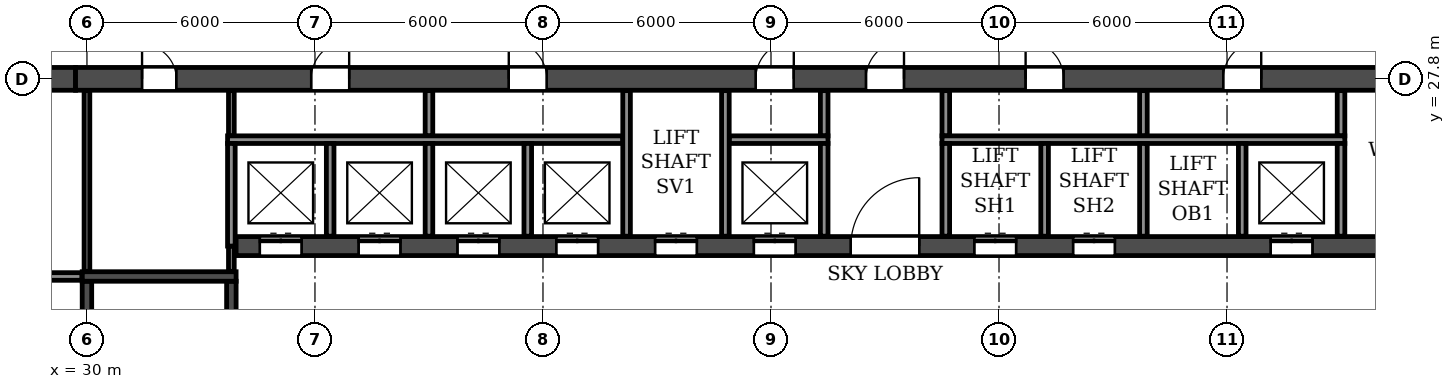
"""IFC4 building model, lengths in metres.
Left out: names, types, materials, properties, quantities, classifications, styles, units other than length and angle.
Written with IfcOpenShell. Run it as: python <this file> out.ifc"""

import sys

from ifc_helpers import new_model, si_unit, direction, frame, frame_2d, origin, place, context, subcontext, project, spatial, rectangle, extrude, element, fill, save


model = new_model("IFC4")
c1 = context("Model", 3, precision=1e-05, world=origin(), true_north=direction((0.0, 1.0)))
c2 = subcontext(c1, "Body", "Model", "MODEL_VIEW")
j1 = project(units=[si_unit("LENGTHUNIT", "METRE"), si_unit("PLANEANGLEUNIT", "RADIAN")], contexts=[c1])
p1 = place(None, origin())
s1 = spatial("IfcSite", under=j1, at=p1, CompositionType="ELEMENT")
p2 = place(p1, origin())
s2 = spatial("IfcBuilding", under=s1, at=p2, CompositionType="ELEMENT")
p3 = place(p2, frame((0.0, 0.0, 115.8)))
s3 = spatial("IfcBuildingStorey", under=s2, at=p3, CompositionType="ELEMENT", Elevation=115.8)
p4 = place(p3, frame((24.9, 27.8, 0.0), z_axis=(0.0, 0.0, 1.0), x_axis=(1.0, 0.0, 0.0)))
e1 = element("IfcWall", 1, at=p4, inside=s3, PredefinedType="SHEAR", context=c2, shape_type="SweptSolid", body=[
    extrude(rectangle(XDim=4.8, YDim=0.6, at=frame_2d((2.4, 0.0))), origin(), (0.0, 0.0, 1.0), 6.37),
])
p5 = place(p4, frame((1.9, 0.0, 0.0)))
e2 = element("IfcOpeningElement", 2, at=p5, cuts=e1, PredefinedType="OPENING", context=c2, shape_type="SweptSolid", body=[
    extrude(rectangle(XDim=1.0, YDim=2.1, at=frame_2d((0.5, 1.05))), frame((0.0, 0.31, 0.0), z_axis=(0.0, -1.0, 0.0), x_axis=(1.0, 0.0, 0.0)), (0.0, 0.0, 1.0), 0.62),
])
p6 = place(p3, frame((29.7, 27.8, 0.0), z_axis=(0.0, 0.0, 1.0), x_axis=(1.0, 0.0, 0.0)))
e3 = element("IfcWall", 3, at=p6, inside=s3, PredefinedType="SOLIDWALL", context=c2, shape_type="SweptSolid", body=[
    extrude(rectangle(XDim=42.6, YDim=0.6, at=frame_2d((21.3, 0.0))), origin(), (0.0, 0.0, 1.0), 6.37),
])
p7 = place(p6, frame((1.75, 0.0, 0.0)))
e4 = element("IfcOpeningElement", 4, at=p7, cuts=e3, PredefinedType="OPENING", context=c2, shape_type="SweptSolid", body=[
    extrude(rectangle(XDim=0.9, YDim=2.1, at=frame_2d((0.45, 1.05))), frame((0.0, 0.31, 0.0), z_axis=(0.0, -1.0, 0.0), x_axis=(1.0, 0.0, 0.0)), (0.0, 0.0, 1.0), 0.62),
])
p8 = place(p6, frame((6.2, 0.0, 0.0)))
e5 = element("IfcOpeningElement", 5, at=p8, cuts=e3, PredefinedType="OPENING", context=c2, shape_type="SweptSolid", body=[
    extrude(rectangle(XDim=1.0, YDim=2.1, at=frame_2d((0.5, 1.05))), frame((0.0, 0.31, 0.0), z_axis=(0.0, -1.0, 0.0), x_axis=(1.0, 0.0, 0.0)), (0.0, 0.0, 1.0), 0.62),
])
p9 = place(p6, frame((11.4, 0.0, 0.0)))
e6 = element("IfcOpeningElement", 6, at=p9, cuts=e3, PredefinedType="OPENING", context=c2, shape_type="SweptSolid", body=[
    extrude(rectangle(XDim=1.0, YDim=2.1, at=frame_2d((0.5, 1.05))), frame((0.0, 0.31, 0.0), z_axis=(0.0, -1.0, 0.0), x_axis=(1.0, 0.0, 0.0)), (0.0, 0.0, 1.0), 0.62),
])
p10 = place(p6, frame((17.9, 0.0, 0.0)))
e7 = element("IfcOpeningElement", 7, at=p10, cuts=e3, PredefinedType="OPENING", context=c2, shape_type="SweptSolid", body=[
    extrude(rectangle(XDim=1.0, YDim=2.1, at=frame_2d((0.5, 1.05))), frame((0.0, 0.31, 0.0), z_axis=(0.0, -1.0, 0.0), x_axis=(1.0, 0.0, 0.0)), (0.0, 0.0, 1.0), 0.62),
])
p11 = place(p6, frame((20.8, 0.0, 0.0)))
e8 = element("IfcOpeningElement", 8, at=p11, cuts=e3, PredefinedType="OPENING", context=c2, shape_type="SweptSolid", body=[
    extrude(rectangle(XDim=1.0, YDim=2.1, at=frame_2d((0.5, 1.05))), frame((0.0, 0.31, 0.0), z_axis=(0.0, -1.0, 0.0), x_axis=(1.0, 0.0, 0.0)), (0.0, 0.0, 1.0), 0.62),
])
p12 = place(p6, frame((25.0, 0.0, 0.0)))
e9 = element("IfcOpeningElement", 9, at=p12, cuts=e3, PredefinedType="OPENING", context=c2, shape_type="SweptSolid", body=[
    extrude(rectangle(XDim=1.0, YDim=2.1, at=frame_2d((0.5, 1.05))), frame((0.0, 0.31, 0.0), z_axis=(0.0, -1.0, 0.0), x_axis=(1.0, 0.0, 0.0)), (0.0, 0.0, 1.0), 0.62),
])
p13 = place(p6, frame((30.2, 0.0, 0.0)))
e10 = element("IfcOpeningElement", 10, at=p13, cuts=e3, PredefinedType="OPENING", context=c2, shape_type="SweptSolid", body=[
    extrude(rectangle(XDim=1.0, YDim=2.1, at=frame_2d((0.5, 1.05))), frame((0.0, 0.31, 0.0), z_axis=(0.0, -1.0, 0.0), x_axis=(1.0, 0.0, 0.0)), (0.0, 0.0, 1.0), 0.62),
])
p14 = place(p6, frame((35.15, 0.0, 0.0)))
e11 = element("IfcOpeningElement", 11, at=p14, cuts=e3, PredefinedType="OPENING", context=c2, shape_type="SweptSolid", body=[
    extrude(rectangle(XDim=1.5, YDim=2.1, at=frame_2d((0.75, 1.05))), frame((0.0, 0.31, 0.0), z_axis=(0.0, -1.0, 0.0), x_axis=(1.0, 0.0, 0.0)), (0.0, 0.0, 1.0), 0.62),
])
p15 = place(p6, frame((39.95, 0.0, 0.0)))
e12 = element("IfcOpeningElement", 12, at=p15, cuts=e3, PredefinedType="OPENING", context=c2, shape_type="SweptSolid", body=[
    extrude(rectangle(XDim=0.9, YDim=2.1, at=frame_2d((0.45, 1.05))), frame((0.0, 0.31, 0.0), z_axis=(0.0, -1.0, 0.0), x_axis=(1.0, 0.0, 0.0)), (0.0, 0.0, 1.0), 0.62),
])
p16 = place(p3, frame((33.925, 23.4, 0.0), z_axis=(0.0, 0.0, 1.0), x_axis=(1.0, 0.0, 0.0)))
e13 = element("IfcWall", 13, at=p16, inside=s3, PredefinedType="SOLIDWALL", context=c2, shape_type="SweptSolid", body=[
    extrude(rectangle(XDim=34.15, YDim=0.5, at=frame_2d((17.075, 0.0))), origin(), (0.0, 0.0, 1.0), 6.37),
])
p17 = place(p16, frame((16.175, 0.0, 0.0)))
e14 = element("IfcOpeningElement", 14, at=p17, cuts=e13, PredefinedType="OPENING", context=c2, shape_type="SweptSolid", body=[
    extrude(rectangle(XDim=1.8, YDim=2.1, at=frame_2d((0.9, 1.05))), frame((0.0, 0.26, 0.0), z_axis=(0.0, -1.0, 0.0), x_axis=(1.0, 0.0, 0.0)), (0.0, 0.0, 1.0), 0.52),
])
p18 = place(p16, frame((0.625, 0.0, 0.0)))
e15 = element("IfcOpeningElement", 15, at=p18, cuts=e13, PredefinedType="OPENING", context=c2, shape_type="SweptSolid", body=[
    extrude(rectangle(XDim=1.1, YDim=2.1, at=frame_2d((0.55, 1.05))), frame((0.0, 0.26, 0.0), z_axis=(0.0, -1.0, 0.0), x_axis=(1.0, 0.0, 0.0)), (0.0, 0.0, 1.0), 0.52),
])
p19 = place(p16, frame((3.225, 0.0, 0.0)))
e16 = element("IfcOpeningElement", 16, at=p19, cuts=e13, PredefinedType="OPENING", context=c2, shape_type="SweptSolid", body=[
    extrude(rectangle(XDim=1.1, YDim=2.1, at=frame_2d((0.55, 1.05))), frame((0.0, 0.26, 0.0), z_axis=(0.0, -1.0, 0.0), x_axis=(1.0, 0.0, 0.0)), (0.0, 0.0, 1.0), 0.52),
])
p20 = place(p16, frame((5.825, 0.0, 0.0)))
e17 = element("IfcOpeningElement", 17, at=p20, cuts=e13, PredefinedType="OPENING", context=c2, shape_type="SweptSolid", body=[
    extrude(rectangle(XDim=1.1, YDim=2.1, at=frame_2d((0.55, 1.05))), frame((0.0, 0.26, 0.0), z_axis=(0.0, -1.0, 0.0), x_axis=(1.0, 0.0, 0.0)), (0.0, 0.0, 1.0), 0.52),
])
p21 = place(p16, frame((8.425, 0.0, 0.0)))
e18 = element("IfcOpeningElement", 18, at=p21, cuts=e13, PredefinedType="OPENING", context=c2, shape_type="SweptSolid", body=[
    extrude(rectangle(XDim=1.1, YDim=2.1, at=frame_2d((0.55, 1.05))), frame((0.0, 0.26, 0.0), z_axis=(0.0, -1.0, 0.0), x_axis=(1.0, 0.0, 0.0)), (0.0, 0.0, 1.0), 0.52),
])
p22 = place(p16, frame((11.025, 0.0, 0.0)))
e19 = element("IfcOpeningElement", 19, at=p22, cuts=e13, PredefinedType="OPENING", context=c2, shape_type="SweptSolid", body=[
    extrude(rectangle(XDim=1.1, YDim=2.1, at=frame_2d((0.55, 1.05))), frame((0.0, 0.26, 0.0), z_axis=(0.0, -1.0, 0.0), x_axis=(1.0, 0.0, 0.0)), (0.0, 0.0, 1.0), 0.52),
])
p23 = place(p16, frame((13.625, 0.0, 0.0)))
e20 = element("IfcOpeningElement", 20, at=p23, cuts=e13, PredefinedType="OPENING", context=c2, shape_type="SweptSolid", body=[
    extrude(rectangle(XDim=1.1, YDim=2.1, at=frame_2d((0.55, 1.05))), frame((0.0, 0.26, 0.0), z_axis=(0.0, -1.0, 0.0), x_axis=(1.0, 0.0, 0.0)), (0.0, 0.0, 1.0), 0.52),
])
p24 = place(p16, frame((19.425, 0.0, 0.0)))
e21 = element("IfcOpeningElement", 21, at=p24, cuts=e13, PredefinedType="OPENING", context=c2, shape_type="SweptSolid", body=[
    extrude(rectangle(XDim=1.1, YDim=2.1, at=frame_2d((0.55, 1.05))), frame((0.0, 0.26, 0.0), z_axis=(0.0, -1.0, 0.0), x_axis=(1.0, 0.0, 0.0)), (0.0, 0.0, 1.0), 0.52),
])
p25 = place(p16, frame((22.025, 0.0, 0.0)))
e22 = element("IfcOpeningElement", 22, at=p25, cuts=e13, PredefinedType="OPENING", context=c2, shape_type="SweptSolid", body=[
    extrude(rectangle(XDim=1.1, YDim=2.1, at=frame_2d((0.55, 1.05))), frame((0.0, 0.26, 0.0), z_axis=(0.0, -1.0, 0.0), x_axis=(1.0, 0.0, 0.0)), (0.0, 0.0, 1.0), 0.52),
])
p26 = place(p16, frame((27.225, 0.0, 0.0)))
e23 = element("IfcOpeningElement", 23, at=p26, cuts=e13, PredefinedType="OPENING", context=c2, shape_type="SweptSolid", body=[
    extrude(rectangle(XDim=1.1, YDim=2.1, at=frame_2d((0.55, 1.05))), frame((0.0, 0.26, 0.0), z_axis=(0.0, -1.0, 0.0), x_axis=(1.0, 0.0, 0.0)), (0.0, 0.0, 1.0), 0.52),
])
p27 = place(p3, frame((30.0, 14.85, 0.0), z_axis=(0.0, 0.0, 1.0), x_axis=(0.0, 1.0, 0.0)))
e24 = element("IfcWall", 24, at=p27, inside=s3, PredefinedType="SOLIDWALL", context=c2, shape_type="SweptSolid", body=[
    extrude(rectangle(XDim=7.625, YDim=0.25, at=frame_2d((3.812, 0.0))), origin(), (0.0, 0.0, 1.0), 6.37),
])
p28 = place(p3, frame((33.8, 14.85, 0.0), z_axis=(0.0, 0.0, 1.0), x_axis=(0.0, 1.0, 0.0)))
e25 = element("IfcWall", 25, at=p28, inside=s3, PredefinedType="SOLIDWALL", context=c2, shape_type="SweptSolid", body=[
    extrude(rectangle(XDim=7.625, YDim=0.25, at=frame_2d((3.812, 0.0))), origin(), (0.0, 0.0, 1.0), 6.37),
])
p29 = place(p28, frame((0.45, 0.0, 0.0)))
e26 = element("IfcOpeningElement", 26, at=p29, cuts=e25, PredefinedType="OPENING", context=c2, shape_type="SweptSolid", body=[
    extrude(rectangle(XDim=1.0, YDim=2.1, at=frame_2d((0.5, 1.05))), frame((0.0, 0.135, 0.0), z_axis=(0.0, -1.0, 0.0), x_axis=(1.0, 0.0, 0.0)), (0.0, 0.0, 1.0), 0.27),
])
p30 = place(p3, frame((29.875, 22.6, 0.0), z_axis=(0.0, 0.0, 1.0), x_axis=(1.0, 0.0, 0.0)))
e27 = element("IfcWall", 27, at=p30, inside=s3, PredefinedType="SOLIDWALL", context=c2, shape_type="SweptSolid", body=[
    extrude(rectangle(XDim=4.05, YDim=0.25, at=frame_2d((2.025, 0.0))), origin(), (0.0, 0.0, 1.0), 6.37),
])
for number, where, z_axis, x_axis in (
    (28, (39.0, 26.3, 0.0), (0.0, 0.0, 1.0), (0.0, 1.0, 0.0)),
    (29, (49.4, 26.3, 0.0), (0.0, 0.0, 1.0), (0.0, 1.0, 0.0)),
    (30, (52.6, 26.3, 0.0), (0.0, 0.0, 1.0), (0.0, 1.0, 0.0)),
    (31, (57.8, 26.3, 0.0), (0.0, 0.0, 1.0), (0.0, 1.0, 0.0)),
    (32, (63.0, 26.3, 0.0), (0.0, 0.0, 1.0), (0.0, 1.0, 0.0)),
):
    element("IfcWall", number, at=place(p3, frame(where, z_axis=z_axis, x_axis=x_axis)), inside=s3, PredefinedType="PARTITIONING", context=c2, shape_type="SweptSolid", body=[
        extrude(rectangle(XDim=1.19, YDim=0.2, at=frame_2d((0.595, 0.0))), origin(), (0.0, 0.0, 1.0), 6.37),
    ])
p31 = place(p3, frame((24.735, 22.6, 0.0), z_axis=(0.0, 0.0, 1.0), x_axis=(1.0, 0.0, 0.0)))
e33 = element("IfcWall", 33, at=p31, inside=s3, PredefinedType="PARTITIONING", context=c2, shape_type="SweptSolid", body=[
    extrude(rectangle(XDim=5.13, YDim=0.2, at=frame_2d((2.565, 0.0))), origin(), (0.0, 0.0, 1.0), 6.37),
])
p32 = place(p3, frame((30.0, 22.735, 0.0), z_axis=(0.0, 0.0, 1.0), x_axis=(0.0, 1.0, 0.0)))
e34 = element("IfcWall", 34, at=p32, inside=s3, PredefinedType="PARTITIONING", context=c2, shape_type="SweptSolid", body=[
    extrude(rectangle(XDim=4.755, YDim=0.15, at=frame_2d((2.377, 0.0))), origin(), (0.0, 0.0, 1.0), 6.37),
])
p33 = place(p3, frame((33.8, 22.735, 0.0), z_axis=(0.0, 0.0, 1.0), x_axis=(0.0, 1.0, 0.0)))
e35 = element("IfcWall", 35, at=p33, inside=s3, PredefinedType="PARTITIONING", context=c2, shape_type="SweptSolid", body=[
    extrude(rectangle(XDim=0.665, YDim=0.15, at=frame_2d((0.333, 0.0))), origin(), (0.0, 0.0, 1.0), 6.37),
])
p34 = place(p3, frame((33.8, 26.3, 0.0), z_axis=(0.0, 0.0, 1.0), x_axis=(0.0, 1.0, 0.0)))
e36 = element("IfcWall", 36, at=p34, inside=s3, PredefinedType="PARTITIONING", context=c2, shape_type="SweptSolid", body=[
    extrude(rectangle(XDim=1.19, YDim=0.15, at=frame_2d((0.595, 0.0))), origin(), (0.0, 0.0, 1.0), 6.37),
])
p35 = place(p3, frame((33.7, 26.2, 0.0), z_axis=(0.0, 0.0, 1.0), x_axis=(1.0, 0.0, 0.0)))
e37 = element("IfcWall", 37, at=p35, inside=s3, PredefinedType="PARTITIONING", context=c2, shape_type="SweptSolid", body=[
    extrude(rectangle(XDim=10.4, YDim=0.2, at=frame_2d((5.2, 0.0))), origin(), (0.0, 0.0, 1.0), 6.37),
])
p36 = place(p3, frame((46.9, 26.2, 0.0), z_axis=(0.0, 0.0, 1.0), x_axis=(1.0, 0.0, 0.0)))
e38 = element("IfcWall", 38, at=p36, inside=s3, PredefinedType="PARTITIONING", context=c2, shape_type="SweptSolid", body=[
    extrude(rectangle(XDim=2.6, YDim=0.2, at=frame_2d((1.3, 0.0))), origin(), (0.0, 0.0, 1.0), 6.37),
])
p37 = place(p3, frame((52.5, 26.2, 0.0), z_axis=(0.0, 0.0, 1.0), x_axis=(1.0, 0.0, 0.0)))
e39 = element("IfcWall", 39, at=p37, inside=s3, PredefinedType="PARTITIONING", context=c2, shape_type="SweptSolid", body=[
    extrude(rectangle(XDim=10.6, YDim=0.2, at=frame_2d((5.3, 0.0))), origin(), (0.0, 0.0, 1.0), 6.37),
])
p38 = place(p3, frame((33.8, 23.4, 0.0), z_axis=(0.0, 0.0, 1.0), x_axis=(0.0, 1.0, 0.0)))
e40 = element("IfcWall", 40, at=p38, inside=s3, PredefinedType="PARTITIONING", context=c2, shape_type="SweptSolid", body=[
    extrude(rectangle(XDim=2.7, YDim=0.2, at=frame_2d((1.35, 0.0))), origin(), (0.0, 0.0, 1.0), 6.37),
])
for number, where, z_axis, x_axis in (
    (41, (36.4, 23.66, 0.0), (0.0, 0.0, 1.0), (0.0, 1.0, 0.0)),
    (42, (39.0, 23.66, 0.0), (0.0, 0.0, 1.0), (0.0, 1.0, 0.0)),
    (43, (41.6, 23.66, 0.0), (0.0, 0.0, 1.0), (0.0, 1.0, 0.0)),
):
    element("IfcWall", number, at=place(p3, frame(where, z_axis=z_axis, x_axis=x_axis)), inside=s3, PredefinedType="PARTITIONING", context=c2, shape_type="SweptSolid", body=[
        extrude(rectangle(XDim=2.44, YDim=0.2, at=frame_2d((1.22, 0.0))), origin(), (0.0, 0.0, 1.0), 6.37),
    ])
for number, where, z_axis, x_axis in (
    (44, (44.2, 23.66, 0.0), (0.0, 0.0, 1.0), (0.0, 1.0, 0.0)),
    (45, (46.8, 23.66, 0.0), (0.0, 0.0, 1.0), (0.0, 1.0, 0.0)),
):
    element("IfcWall", number, at=place(p3, frame(where, z_axis=z_axis, x_axis=x_axis)), inside=s3, PredefinedType="PARTITIONING", context=c2, shape_type="SweptSolid", body=[
        extrude(rectangle(XDim=3.83, YDim=0.2, at=frame_2d((1.915, 0.0))), origin(), (0.0, 0.0, 1.0), 6.37),
    ])
for number, where, z_axis, x_axis in (
    (46, (49.4, 23.66, 0.0), (0.0, 0.0, 1.0), (0.0, 1.0, 0.0)),
    (47, (52.6, 23.66, 0.0), (0.0, 0.0, 1.0), (0.0, 1.0, 0.0)),
    (48, (55.2, 23.66, 0.0), (0.0, 0.0, 1.0), (0.0, 1.0, 0.0)),
    (49, (57.8, 23.66, 0.0), (0.0, 0.0, 1.0), (0.0, 1.0, 0.0)),
    (50, (60.4, 23.66, 0.0), (0.0, 0.0, 1.0), (0.0, 1.0, 0.0)),
    (51, (63.0, 23.66, 0.0), (0.0, 0.0, 1.0), (0.0, 1.0, 0.0)),
):
    element("IfcWall", number, at=place(p3, frame(where, z_axis=z_axis, x_axis=x_axis)), inside=s3, PredefinedType="PARTITIONING", context=c2, shape_type="SweptSolid", body=[
        extrude(rectangle(XDim=2.44, YDim=0.2, at=frame_2d((1.22, 0.0))), origin(), (0.0, 0.0, 1.0), 6.37),
    ])
p39 = place(p7, origin())
e52 = element("IfcDoor", 52, at=p39, inside=s3, OperationType="SINGLE_SWING_LEFT", PredefinedType="DOOR", context=c2, shape_type="SweptSolid", body=[
    extrude(rectangle(XDim=0.9, YDim=2.1, at=frame_2d((0.45, 1.05))), frame((0.0, 0.025, 0.0), z_axis=(0.0, -1.0, 0.0), x_axis=(1.0, 0.0, 0.0)), (0.0, 0.0, 1.0), 0.05),
])
fill(e4, e52)
p40 = place(p8, origin())
e53 = element("IfcDoor", 53, at=p40, inside=s3, OperationType="SINGLE_SWING_RIGHT", PredefinedType="DOOR", context=c2, shape_type="SweptSolid", body=[
    extrude(rectangle(XDim=1.0, YDim=2.1, at=frame_2d((0.5, 1.05))), frame((0.0, 0.025, 0.0), z_axis=(0.0, -1.0, 0.0), x_axis=(1.0, 0.0, 0.0)), (0.0, 0.0, 1.0), 0.05),
])
fill(e5, e53)
p41 = place(p9, origin())
e54 = element("IfcDoor", 54, at=p41, inside=s3, OperationType="SINGLE_SWING_LEFT", PredefinedType="DOOR", context=c2, shape_type="SweptSolid", body=[
    extrude(rectangle(XDim=1.0, YDim=2.1, at=frame_2d((0.5, 1.05))), frame((0.0, 0.025, 0.0), z_axis=(0.0, -1.0, 0.0), x_axis=(1.0, 0.0, 0.0)), (0.0, 0.0, 1.0), 0.05),
])
fill(e6, e54)
p42 = place(p10, origin())
e55 = element("IfcDoor", 55, at=p42, inside=s3, OperationType="SINGLE_SWING_RIGHT", PredefinedType="DOOR", context=c2, shape_type="SweptSolid", body=[
    extrude(rectangle(XDim=1.0, YDim=2.1, at=frame_2d((0.5, 1.05))), frame((0.0, 0.025, 0.0), z_axis=(0.0, -1.0, 0.0), x_axis=(1.0, 0.0, 0.0)), (0.0, 0.0, 1.0), 0.05),
])
fill(e7, e55)
p43 = place(p11, origin())
e56 = element("IfcDoor", 56, at=p43, inside=s3, OperationType="SINGLE_SWING_RIGHT", PredefinedType="DOOR", context=c2, shape_type="SweptSolid", body=[
    extrude(rectangle(XDim=1.0, YDim=2.1, at=frame_2d((0.5, 1.05))), frame((0.0, 0.025, 0.0), z_axis=(0.0, -1.0, 0.0), x_axis=(1.0, 0.0, 0.0)), (0.0, 0.0, 1.0), 0.05),
])
fill(e8, e56)
p44 = place(p12, origin())
e57 = element("IfcDoor", 57, at=p44, inside=s3, OperationType="SINGLE_SWING_LEFT", PredefinedType="DOOR", context=c2, shape_type="SweptSolid", body=[
    extrude(rectangle(XDim=1.0, YDim=2.1, at=frame_2d((0.5, 1.05))), frame((0.0, 0.025, 0.0), z_axis=(0.0, -1.0, 0.0), x_axis=(1.0, 0.0, 0.0)), (0.0, 0.0, 1.0), 0.05),
])
fill(e9, e57)
p45 = place(p13, origin())
e58 = element("IfcDoor", 58, at=p45, inside=s3, OperationType="SINGLE_SWING_RIGHT", PredefinedType="DOOR", context=c2, shape_type="SweptSolid", body=[
    extrude(rectangle(XDim=1.0, YDim=2.1, at=frame_2d((0.5, 1.05))), frame((0.0, 0.025, 0.0), z_axis=(0.0, -1.0, 0.0), x_axis=(1.0, 0.0, 0.0)), (0.0, 0.0, 1.0), 0.05),
])
fill(e10, e58)
p46 = place(p17, origin())
e59 = element("IfcDoor", 59, at=p46, inside=s3, OperationType="DOUBLE_DOOR_SINGLE_SWING", PredefinedType="DOOR", context=c2, shape_type="SweptSolid", body=[
    extrude(rectangle(XDim=1.8, YDim=2.1, at=frame_2d((0.9, 1.05))), frame((0.0, 0.025, 0.0), z_axis=(0.0, -1.0, 0.0), x_axis=(1.0, 0.0, 0.0)), (0.0, 0.0, 1.0), 0.05),
])
fill(e14, e59)
p47 = place(p18, origin())
e60 = element("IfcDoor", 60, at=p47, inside=s3, OperationType="DOUBLE_DOOR_SLIDING", PredefinedType="DOOR", context=c2, shape_type="SweptSolid", body=[
    extrude(rectangle(XDim=1.1, YDim=2.1, at=frame_2d((0.55, 1.05))), frame((0.0, 0.025, 0.0), z_axis=(0.0, -1.0, 0.0), x_axis=(1.0, 0.0, 0.0)), (0.0, 0.0, 1.0), 0.05),
])
fill(e15, e60)
p48 = place(p19, origin())
e61 = element("IfcDoor", 61, at=p48, inside=s3, OperationType="DOUBLE_DOOR_SLIDING", PredefinedType="DOOR", context=c2, shape_type="SweptSolid", body=[
    extrude(rectangle(XDim=1.1, YDim=2.1, at=frame_2d((0.55, 1.05))), frame((0.0, 0.025, 0.0), z_axis=(0.0, -1.0, 0.0), x_axis=(1.0, 0.0, 0.0)), (0.0, 0.0, 1.0), 0.05),
])
fill(e16, e61)
p49 = place(p20, origin())
e62 = element("IfcDoor", 62, at=p49, inside=s3, OperationType="DOUBLE_DOOR_SLIDING", PredefinedType="DOOR", context=c2, shape_type="SweptSolid", body=[
    extrude(rectangle(XDim=1.1, YDim=2.1, at=frame_2d((0.55, 1.05))), frame((0.0, 0.025, 0.0), z_axis=(0.0, -1.0, 0.0), x_axis=(1.0, 0.0, 0.0)), (0.0, 0.0, 1.0), 0.05),
])
fill(e17, e62)
p50 = place(p21, origin())
e63 = element("IfcDoor", 63, at=p50, inside=s3, OperationType="DOUBLE_DOOR_SLIDING", PredefinedType="DOOR", context=c2, shape_type="SweptSolid", body=[
    extrude(rectangle(XDim=1.1, YDim=2.1, at=frame_2d((0.55, 1.05))), frame((0.0, 0.025, 0.0), z_axis=(0.0, -1.0, 0.0), x_axis=(1.0, 0.0, 0.0)), (0.0, 0.0, 1.0), 0.05),
])
fill(e18, e63)
p51 = place(p22, origin())
e64 = element("IfcDoor", 64, at=p51, inside=s3, OperationType="DOUBLE_DOOR_SLIDING", PredefinedType="DOOR", context=c2, shape_type="SweptSolid", body=[
    extrude(rectangle(XDim=1.1, YDim=2.1, at=frame_2d((0.55, 1.05))), frame((0.0, 0.025, 0.0), z_axis=(0.0, -1.0, 0.0), x_axis=(1.0, 0.0, 0.0)), (0.0, 0.0, 1.0), 0.05),
])
fill(e19, e64)
p52 = place(p23, origin())
e65 = element("IfcDoor", 65, at=p52, inside=s3, OperationType="DOUBLE_DOOR_SLIDING", PredefinedType="DOOR", context=c2, shape_type="SweptSolid", body=[
    extrude(rectangle(XDim=1.1, YDim=2.1, at=frame_2d((0.55, 1.05))), frame((0.0, 0.025, 0.0), z_axis=(0.0, -1.0, 0.0), x_axis=(1.0, 0.0, 0.0)), (0.0, 0.0, 1.0), 0.05),
])
fill(e20, e65)
p53 = place(p24, origin())
e66 = element("IfcDoor", 66, at=p53, inside=s3, OperationType="DOUBLE_DOOR_SLIDING", PredefinedType="DOOR", context=c2, shape_type="SweptSolid", body=[
    extrude(rectangle(XDim=1.1, YDim=2.1, at=frame_2d((0.55, 1.05))), frame((0.0, 0.025, 0.0), z_axis=(0.0, -1.0, 0.0), x_axis=(1.0, 0.0, 0.0)), (0.0, 0.0, 1.0), 0.05),
])
fill(e21, e66)
p54 = place(p25, origin())
e67 = element("IfcDoor", 67, at=p54, inside=s3, OperationType="DOUBLE_DOOR_SLIDING", PredefinedType="DOOR", context=c2, shape_type="SweptSolid", body=[
    extrude(rectangle(XDim=1.1, YDim=2.1, at=frame_2d((0.55, 1.05))), frame((0.0, 0.025, 0.0), z_axis=(0.0, -1.0, 0.0), x_axis=(1.0, 0.0, 0.0)), (0.0, 0.0, 1.0), 0.05),
])
fill(e22, e67)
p55 = place(p26, origin())
e68 = element("IfcDoor", 68, at=p55, inside=s3, OperationType="DOUBLE_DOOR_SLIDING", PredefinedType="DOOR", context=c2, shape_type="SweptSolid", body=[
    extrude(rectangle(XDim=1.1, YDim=2.1, at=frame_2d((0.55, 1.05))), frame((0.0, 0.025, 0.0), z_axis=(0.0, -1.0, 0.0), x_axis=(1.0, 0.0, 0.0)), (0.0, 0.0, 1.0), 0.05),
])
fill(e23, e68)
save(model, sys.argv[1])
